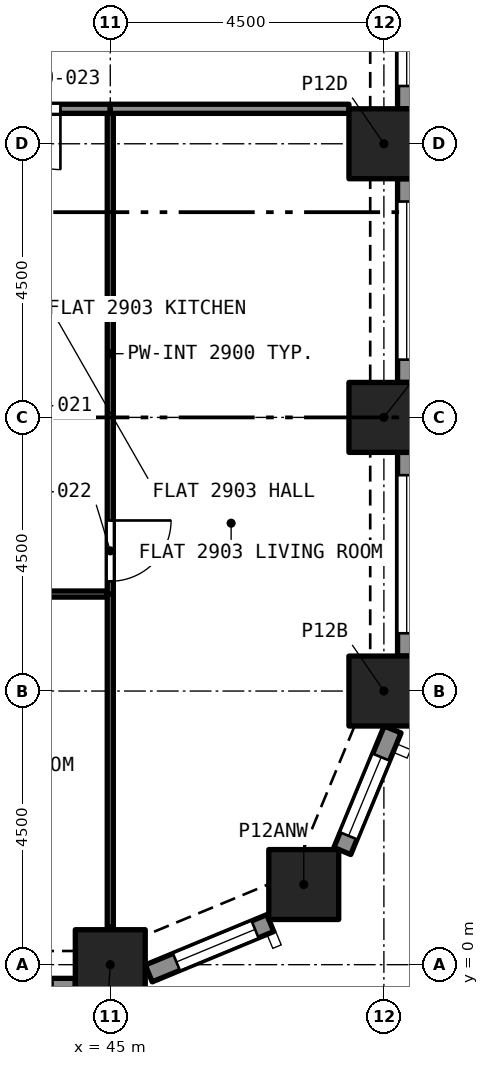
"""IFC4 building model, lengths in metres.
Left out: names, types, materials, properties, quantities, classifications, styles, units other than length and angle.
Written with IfcOpenShell. Run it as: python <this file> out.ifc"""

import sys

from ifc_helpers import new_model, si_unit, direction, frame, frame_2d, origin, origin_2d, place, context, subcontext, project, spatial, rectangle, extrude, element, fill, save


model = new_model("IFC4")
c1 = context("Model", 3, precision=1e-05, world=origin(), true_north=direction((0.0, 1.0)))
c2 = subcontext(c1, "Body", "Model", "MODEL_VIEW")
j1 = project(units=[si_unit("LENGTHUNIT", "METRE"), si_unit("PLANEANGLEUNIT", "RADIAN")], contexts=[c1])
p1 = place(None, origin())
s1 = spatial("IfcSite", under=j1, at=p1, CompositionType="ELEMENT")
p2 = place(p1, origin())
s2 = spatial("IfcBuilding", under=s1, at=p2, CompositionType="ELEMENT")
p3 = place(p2, frame((0.0, 0.0, 105.6)))
s3 = spatial("IfcBuildingStorey", under=s2, at=p3, CompositionType="ELEMENT", Elevation=105.6)
for number, where, z_axis, x_axis in (
    (1, (45.0, 0.0, 0.0), (0.0, 0.0, 1.0), (1.0, 0.0, 0.0)),
    (2, (48.182, 1.318, 0.0), (0.0, 0.0, 1.0), (1.0, 0.0, 0.0)),
    (3, (49.5, 4.5, 0.0), (0.0, 0.0, 1.0), (1.0, 0.0, 0.0)),
    (4, (49.5, 9.0, 0.0), (0.0, 0.0, 1.0), (1.0, 0.0, 0.0)),
    (5, (49.5, 13.5, 0.0), (0.0, 0.0, 1.0), (1.0, 0.0, 0.0)),
):
    element("IfcColumn", number, at=place(p3, frame(where, z_axis=z_axis, x_axis=x_axis)), inside=s3, PredefinedType="COLUMN", context=c2, shape_type="SweptSolid", body=[
        extrude(rectangle(XDim=1.15, YDim=1.15, at=origin_2d()), origin(), (0.0, 0.0, 1.0), 3.2),
    ])
p4 = place(p3, frame((44.425, -0.375, 0.0), z_axis=(0.0, 0.0, 1.0), x_axis=(-1.0, 0.0, 0.0)))
e6 = element("IfcWall", 6, at=p4, inside=s3, PredefinedType="SOLIDWALL", context=c2, shape_type="SweptSolid", body=[
    extrude(rectangle(XDim=3.35, YDim=0.3, at=frame_2d((1.675, 0.0))), origin(), (0.0, 0.0, 1.0), 3.2),
])
p5 = place(p4, frame((0.375, 0.0, 0.45)))
e7 = element("IfcOpeningElement", 7, at=p5, cuts=e6, PredefinedType="OPENING", context=c2, shape_type="SweptSolid", body=[
    extrude(rectangle(XDim=2.6, YDim=1.95, at=frame_2d((1.3, 0.975))), frame((0.0, 0.16, 0.0), z_axis=(0.0, -1.0, 0.0), x_axis=(1.0, 0.0, 0.0)), (0.0, 0.0, 1.0), 0.32),
])
p6 = place(p3, frame((47.631, 0.684, 0.0), z_axis=(0.0, 0.0, 1.0), x_axis=(-0.923862802911, -0.382723818695, 0.0)))
e8 = element("IfcWall", 8, at=p6, inside=s3, PredefinedType="SOLIDWALL", context=c2, shape_type="SweptSolid", body=[
    extrude(rectangle(XDim=2.164, YDim=0.3, at=frame_2d((1.082, 0.0))), origin(), (0.0, 0.0, 1.0), 3.2),
])
p7 = place(p6, frame((0.271, 0.0, 0.45)))
e9 = element("IfcOpeningElement", 9, at=p7, cuts=e8, PredefinedType="OPENING", context=c2, shape_type="SweptSolid", body=[
    extrude(rectangle(XDim=1.4, YDim=1.95, at=frame_2d((0.7, 0.975))), frame((0.0, 0.16, 0.0), z_axis=(0.0, -1.0, 0.0), x_axis=(1.0, 0.0, 0.0)), (0.0, 0.0, 1.0), 0.32),
])
p8 = place(p3, frame((49.644, 3.868, 0.0), z_axis=(0.0, 0.0, 1.0), x_axis=(-0.382723818695, -0.923862802911, 0.0)))
e10 = element("IfcWall", 10, at=p8, inside=s3, PredefinedType="SOLIDWALL", context=c2, shape_type="SweptSolid", body=[
    extrude(rectangle(XDim=2.164, YDim=0.3, at=frame_2d((1.082, 0.0))), origin(), (0.0, 0.0, 1.0), 3.2),
])
p9 = place(p8, frame((0.493, 0.0, 0.45)))
e11 = element("IfcOpeningElement", 11, at=p9, cuts=e10, PredefinedType="OPENING", context=c2, shape_type="SweptSolid", body=[
    extrude(rectangle(XDim=1.4, YDim=1.95, at=frame_2d((0.7, 0.975))), frame((0.0, 0.16, 0.0), z_axis=(0.0, -1.0, 0.0), x_axis=(1.0, 0.0, 0.0)), (0.0, 0.0, 1.0), 0.32),
])
p10 = place(p3, frame((49.875, 8.425, 0.0), z_axis=(0.0, 0.0, 1.0), x_axis=(0.0, -1.0, 0.0)))
e12 = element("IfcWall", 12, at=p10, inside=s3, PredefinedType="SOLIDWALL", context=c2, shape_type="SweptSolid", body=[
    extrude(rectangle(XDim=3.35, YDim=0.3, at=frame_2d((1.675, 0.0))), origin(), (0.0, 0.0, 1.0), 3.2),
])
p11 = place(p10, frame((0.375, 0.0, 0.45)))
e13 = element("IfcOpeningElement", 13, at=p11, cuts=e12, PredefinedType="OPENING", context=c2, shape_type="SweptSolid", body=[
    extrude(rectangle(XDim=2.6, YDim=1.95, at=frame_2d((1.3, 0.975))), frame((0.0, 0.16, 0.0), z_axis=(0.0, -1.0, 0.0), x_axis=(1.0, 0.0, 0.0)), (0.0, 0.0, 1.0), 0.32),
])
p12 = place(p3, frame((49.875, 12.925, 0.0), z_axis=(0.0, 0.0, 1.0), x_axis=(0.0, -1.0, 0.0)))
e14 = element("IfcWall", 14, at=p12, inside=s3, PredefinedType="SOLIDWALL", context=c2, shape_type="SweptSolid", body=[
    extrude(rectangle(XDim=3.35, YDim=0.3, at=frame_2d((1.675, 0.0))), origin(), (0.0, 0.0, 1.0), 3.2),
])
p13 = place(p12, frame((0.375, 0.0, 0.45)))
e15 = element("IfcOpeningElement", 15, at=p13, cuts=e14, PredefinedType="OPENING", context=c2, shape_type="SweptSolid", body=[
    extrude(rectangle(XDim=2.6, YDim=1.95, at=frame_2d((1.3, 0.975))), frame((0.0, 0.16, 0.0), z_axis=(0.0, -1.0, 0.0), x_axis=(1.0, 0.0, 0.0)), (0.0, 0.0, 1.0), 0.32),
])
p14 = place(p3, frame((49.875, 17.425, 0.0), z_axis=(0.0, 0.0, 1.0), x_axis=(0.0, -1.0, 0.0)))
e16 = element("IfcWall", 16, at=p14, inside=s3, PredefinedType="SOLIDWALL", context=c2, shape_type="SweptSolid", body=[
    extrude(rectangle(XDim=3.35, YDim=0.3, at=frame_2d((1.675, 0.0))), origin(), (0.0, 0.0, 1.0), 3.2),
])
p15 = place(p14, frame((0.375, 0.0, 0.45)))
e17 = element("IfcOpeningElement", 17, at=p15, cuts=e16, PredefinedType="OPENING", context=c2, shape_type="SweptSolid", body=[
    extrude(rectangle(XDim=2.6, YDim=1.95, at=frame_2d((1.3, 0.975))), frame((0.0, 0.16, 0.0), z_axis=(0.0, -1.0, 0.0), x_axis=(1.0, 0.0, 0.0)), (0.0, 0.0, 1.0), 0.32),
])
p16 = place(p3, frame((44.95, 6.095, 0.0), z_axis=(0.0, 0.0, 1.0), x_axis=(-1.0, 0.0, 0.0)))
e18 = element("IfcWall", 18, at=p16, inside=s3, PredefinedType="PARTITIONING", context=c2, shape_type="SweptSolid", body=[
    extrude(rectangle(XDim=4.35, YDim=0.1, at=frame_2d((2.175, 0.0))), origin(), (0.0, 0.0, 1.0), 2.9),
])
p17 = place(p16, frame((1.75, 0.0, 0.0)))
e19 = element("IfcOpeningElement", 19, at=p17, cuts=e18, PredefinedType="OPENING", context=c2, shape_type="SweptSolid", body=[
    extrude(rectangle(XDim=0.9, YDim=2.1, at=frame_2d((0.45, 1.05))), frame((0.0, 0.06, 0.0), z_axis=(0.0, -1.0, 0.0), x_axis=(1.0, 0.0, 0.0)), (0.0, 0.0, 1.0), 0.12),
])
p18 = place(p3, frame((45.0, 0.622, 0.0), z_axis=(0.0, 0.0, 1.0), x_axis=(0.0, 1.0, 0.0)))
e20 = element("IfcWall", 20, at=p18, inside=s3, PredefinedType="PARTITIONING", context=c2, shape_type="SweptSolid", body=[
    extrude(rectangle(XDim=5.473, YDim=0.1, at=frame_2d((2.736, 0.0))), origin(), (0.0, 0.0, 1.0), 2.9),
])
p19 = place(p3, frame((45.0, 14.0, 0.0), z_axis=(0.0, 0.0, 1.0), x_axis=(0.0, -1.0, 0.0)))
e21 = element("IfcWall", 21, at=p19, inside=s3, PredefinedType="PARTITIONING", context=c2, shape_type="SweptSolid", body=[
    extrude(rectangle(XDim=7.905, YDim=0.1, at=frame_2d((3.953, 0.0))), origin(), (0.0, 0.0, 1.0), 2.9),
])
p20 = place(p19, frame((6.695, 0.0, 0.0)))
e22 = element("IfcOpeningElement", 22, at=p20, cuts=e21, PredefinedType="OPENING", context=c2, shape_type="SweptSolid", body=[
    extrude(rectangle(XDim=1.0, YDim=2.1, at=frame_2d((0.5, 1.05))), frame((0.0, 0.06, 0.0), z_axis=(0.0, -1.0, 0.0), x_axis=(1.0, 0.0, 0.0)), (0.0, 0.0, 1.0), 0.12),
])
p21 = place(p3, frame((45.0, 14.075, 0.0), z_axis=(0.0, 0.0, 1.0), x_axis=(-1.0, 0.0, 0.0)))
e23 = element("IfcWall", 23, at=p21, inside=s3, PredefinedType="PARTITIONING", context=c2, shape_type="SweptSolid", body=[
    extrude(rectangle(XDim=1.95, YDim=0.15, at=frame_2d((0.975, 0.0))), origin(), (0.0, 0.0, 1.0), 2.9),
])
p22 = place(p21, frame((0.82, 0.0, 0.0)))
e24 = element("IfcOpeningElement", 24, at=p22, cuts=e23, PredefinedType="OPENING", context=c2, shape_type="SweptSolid", body=[
    extrude(rectangle(XDim=1.0, YDim=2.1, at=frame_2d((0.5, 1.05))), frame((0.0, 0.085, 0.0), z_axis=(0.0, -1.0, 0.0), x_axis=(1.0, 0.0, 0.0)), (0.0, 0.0, 1.0), 0.17),
])
p23 = place(p3, frame((45.0, 14.075, 0.0), z_axis=(0.0, 0.0, 1.0), x_axis=(1.0, 0.0, 0.0)))
e25 = element("IfcWall", 25, at=p23, inside=s3, PredefinedType="PARTITIONING", context=c2, shape_type="SweptSolid", body=[
    extrude(rectangle(XDim=3.925, YDim=0.15, at=frame_2d((1.962, 0.0))), origin(), (0.0, 0.0, 1.0), 2.9),
])
p24 = place(p7, origin())
e26 = element("IfcWindow", 26, at=p24, inside=s3, PartitioningType="SINGLE_PANEL", PredefinedType="WINDOW", context=c2, shape_type="SweptSolid", body=[
    extrude(rectangle(XDim=1.4, YDim=1.95, at=frame_2d((0.7, 0.975))), frame((0.0, 0.03, 0.0), z_axis=(0.0, -1.0, 0.0), x_axis=(1.0, 0.0, 0.0)), (0.0, 0.0, 1.0), 0.06),
])
fill(e9, e26)
p25 = place(p9, origin())
e27 = element("IfcWindow", 27, at=p25, inside=s3, PartitioningType="SINGLE_PANEL", PredefinedType="WINDOW", context=c2, shape_type="SweptSolid", body=[
    extrude(rectangle(XDim=1.4, YDim=1.95, at=frame_2d((0.7, 0.975))), frame((0.0, 0.03, 0.0), z_axis=(0.0, -1.0, 0.0), x_axis=(1.0, 0.0, 0.0)), (0.0, 0.0, 1.0), 0.06),
])
fill(e11, e27)
p26 = place(p11, origin())
e28 = element("IfcWindow", 28, at=p26, inside=s3, PartitioningType="SINGLE_PANEL", PredefinedType="WINDOW", context=c2, shape_type="SweptSolid", body=[
    extrude(rectangle(XDim=2.6, YDim=1.95, at=frame_2d((1.3, 0.975))), frame((0.0, 0.03, 0.0), z_axis=(0.0, -1.0, 0.0), x_axis=(1.0, 0.0, 0.0)), (0.0, 0.0, 1.0), 0.06),
])
fill(e13, e28)
p27 = place(p13, origin())
e29 = element("IfcWindow", 29, at=p27, inside=s3, PartitioningType="SINGLE_PANEL", PredefinedType="WINDOW", context=c2, shape_type="SweptSolid", body=[
    extrude(rectangle(XDim=2.6, YDim=1.95, at=frame_2d((1.3, 0.975))), frame((0.0, 0.03, 0.0), z_axis=(0.0, -1.0, 0.0), x_axis=(1.0, 0.0, 0.0)), (0.0, 0.0, 1.0), 0.06),
])
fill(e15, e29)
p28 = place(p15, origin())
e30 = element("IfcWindow", 30, at=p28, inside=s3, PartitioningType="SINGLE_PANEL", PredefinedType="WINDOW", context=c2, shape_type="SweptSolid", body=[
    extrude(rectangle(XDim=2.6, YDim=1.95, at=frame_2d((1.3, 0.975))), frame((0.0, 0.03, 0.0), z_axis=(0.0, -1.0, 0.0), x_axis=(1.0, 0.0, 0.0)), (0.0, 0.0, 1.0), 0.06),
])
fill(e17, e30)
p29 = place(p20, origin())
e31 = element("IfcDoor", 31, at=p29, inside=s3, OperationType="SINGLE_SWING_RIGHT", PredefinedType="DOOR", context=c2, shape_type="SweptSolid", body=[
    extrude(rectangle(XDim=1.0, YDim=2.1, at=frame_2d((0.5, 1.05))), frame((0.0, 0.025, 0.0), z_axis=(0.0, -1.0, 0.0), x_axis=(1.0, 0.0, 0.0)), (0.0, 0.0, 1.0), 0.05),
])
fill(e22, e31)
p30 = place(p22, origin())
e32 = element("IfcDoor", 32, at=p30, inside=s3, OperationType="SINGLE_SWING_RIGHT", PredefinedType="DOOR", context=c2, shape_type="SweptSolid", body=[
    extrude(rectangle(XDim=1.0, YDim=2.1, at=frame_2d((0.5, 1.05))), frame((0.0, 0.025, 0.0), z_axis=(0.0, -1.0, 0.0), x_axis=(1.0, 0.0, 0.0)), (0.0, 0.0, 1.0), 0.05),
])
fill(e24, e32)
save(model, sys.argv[1])
